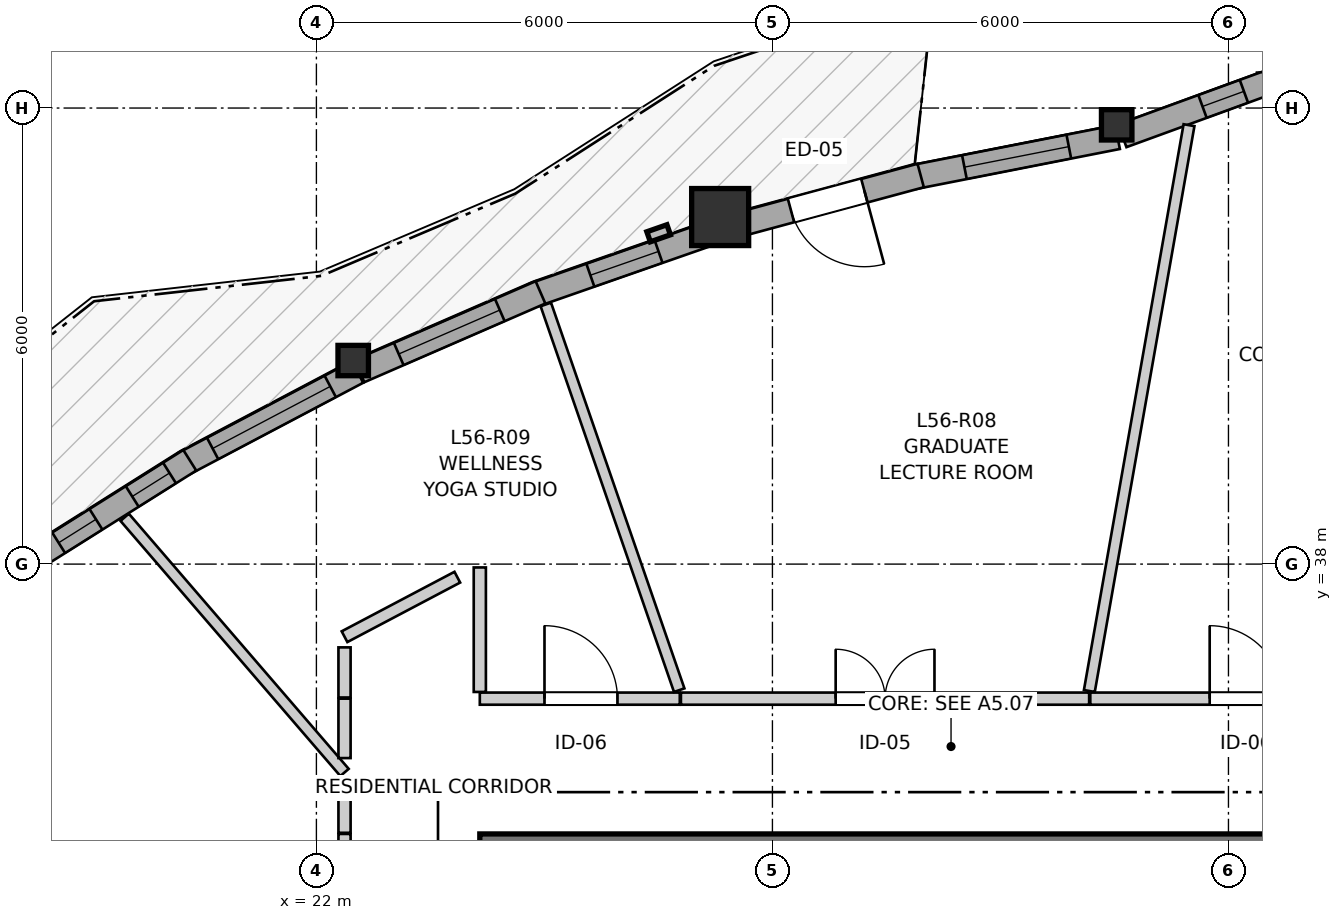
"""IFC4 building model, lengths in metres.
Left out: names, types, materials, properties, quantities, classifications, styles, units other than length and angle.
Written with IfcOpenShell. Run it as: python <this file> out.ifc"""

import sys

from ifc_helpers import new_model, si_unit, direction, frame, frame_2d, origin, origin_2d, place, context, subcontext, project, spatial, rectangle, i_section, extrude, source, transform, mapped, element, fill, save


model = new_model("IFC4")
c1 = context("Model", 3, precision=1e-05, world=origin(), true_north=direction((0.0, 1.0)))
c2 = subcontext(c1, "Body", "Model", "MODEL_VIEW")
j1 = project(units=[si_unit("LENGTHUNIT", "METRE"), si_unit("PLANEANGLEUNIT", "RADIAN")], contexts=[c1])
p1 = place(None, origin())
s1 = spatial("IfcSite", under=j1, at=p1, CompositionType="ELEMENT")
p2 = place(p1, origin())
s2 = spatial("IfcBuilding", under=s1, at=p2, CompositionType="ELEMENT")
p3 = place(p2, frame((0.0, 0.0, 187.4)))
s3 = spatial("IfcBuildingStorey", under=s2, at=p3, CompositionType="ELEMENT", Elevation=187.4)
p4 = place(p3, frame((36.55, 34.125, 0.0), z_axis=(0.0, 0.0, 1.0), x_axis=(-1.0, 0.0, 0.0)))
e1 = element("IfcWall", 1, at=p4, inside=s3, PredefinedType="SHEAR", context=c2, shape_type="SweptSolid", body=[
    extrude(rectangle(XDim=12.4, YDim=0.65, at=frame_2d((6.2, 0.0))), origin(), (0.0, 0.0, 1.0), 2.9),
])
m1 = source(origin(), c2, "Body", "SweptSolid", [
    extrude(i_section(OverallWidth=0.401, OverallDepth=0.399, WebThickness=0.023, FlangeThickness=0.036, FilletRadius=0.015, at=origin_2d()), origin(), (0.0, 0.0, 1.0), 2.9),
])
p5 = place(p3, frame((32.529, 43.779, 0.0), z_axis=(0.0, 0.0, 1.0), x_axis=(1.0, 0.0, 0.0)))
e2 = element("IfcColumn", 2, at=p5, inside=s3, PredefinedType="PILASTER", context=c2, shape_type="MappedRepresentation", body=[
    mapped(m1, transform((0.0, 0.0, 0.0), x_axis=(1.0, 0.0, 0.0), y_axis=(0.0, 1.0, 0.0), z_axis=(0.0, 0.0, 1.0), scale=1.0)),
])
m2 = source(origin(), c2, "Body", "SweptSolid", [
    extrude(rectangle(XDim=0.75, YDim=0.75, at=origin_2d()), origin(), (0.0, 0.0, 1.0), 2.9),
])
p6 = place(p3, frame((27.312, 42.566, 0.0), z_axis=(0.0, 0.0, 1.0), x_axis=(1.0, 0.0, 0.0)))
e3 = element("IfcColumn", 3, at=p6, inside=s3, PredefinedType="COLUMN", context=c2, shape_type="MappedRepresentation", body=[
    mapped(m2, transform((0.0, 0.0, 0.0), x_axis=(1.0, 0.0, 0.0), y_axis=(0.0, 1.0, 0.0), z_axis=(0.0, 0.0, 1.0), scale=1.0)),
])
p7 = place(p3, frame((22.484, 40.678, 0.0), z_axis=(0.0, 0.0, 1.0), x_axis=(1.0, 0.0, 0.0)))
e4 = element("IfcColumn", 4, at=p7, inside=s3, PredefinedType="PILASTER", context=c2, shape_type="MappedRepresentation", body=[
    mapped(m1, transform((0.0, 0.0, 0.0), x_axis=(1.0, 0.0, 0.0), y_axis=(0.0, 1.0, 0.0), z_axis=(0.0, 0.0, 1.0), scale=1.0)),
])
p8 = place(p3, frame((36.456, 44.311, 0.0), z_axis=(0.0, 0.0, 1.0), x_axis=(-0.999997246765, -0.002346585115, 0.0)))
e5 = element("IfcWall", 5, at=p8, inside=s3, PredefinedType="SOLIDWALL", context=c2, shape_type="SweptSolid", body=[
    extrude(rectangle(XDim=2.081, YDim=0.32, at=frame_2d((1.041, 0.0))), origin(), (0.0, 0.0, 1.0), 2.48),
])
p9 = place(p8, frame((0.315, 0.0, 0.82)))
e6 = element("IfcOpeningElement", 6, at=p9, cuts=e5, PredefinedType="OPENING", context=c2, shape_type="SweptSolid", body=[
    extrude(rectangle(XDim=1.45, YDim=1.25, at=frame_2d((0.725, 0.625))), frame((0.0, 0.17, 0.0), z_axis=(0.0, -1.0, 0.0), x_axis=(1.0, 0.0, 0.0)), (0.0, 0.0, 1.0), 0.34),
])
p10 = place(p3, frame((34.503, 44.329, 0.0), z_axis=(0.0, 0.0, 1.0), x_axis=(-0.939387553708, -0.342857148007, 0.0)))
e7 = element("IfcWall", 7, at=p10, inside=s3, PredefinedType="SOLIDWALL", context=c2, shape_type="SweptSolid", body=[
    extrude(rectangle(XDim=2.023, YDim=0.32, at=frame_2d((1.011, 0.0))), origin(), (0.0, 0.0, 1.0), 2.48),
])
p11 = place(p10, frame((0.319, 0.0, 0.82)))
e8 = element("IfcOpeningElement", 8, at=p11, cuts=e7, PredefinedType="OPENING", context=c2, shape_type="SweptSolid", body=[
    extrude(rectangle(XDim=0.58, YDim=1.35, at=frame_2d((0.29, 0.675))), frame((0.0, 0.17, 0.0), z_axis=(0.0, -1.0, 0.0), x_axis=(1.0, 0.0, 0.0)), (0.0, 0.0, 1.0), 0.34),
])
p12 = place(p3, frame((32.541, 43.618, 0.0), z_axis=(0.0, 0.0, 1.0), x_axis=(-0.981233088351, -0.192825377804, 0.0)))
e9 = element("IfcWall", 9, at=p12, inside=s3, PredefinedType="SOLIDWALL", context=c2, shape_type="SweptSolid", body=[
    extrude(rectangle(XDim=2.726, YDim=0.32, at=frame_2d((1.363, 0.0))), origin(), (0.0, 0.0, 1.0), 2.48),
])
p13 = place(p12, frame((0.653, 0.0, 0.82)))
e10 = element("IfcOpeningElement", 10, at=p13, cuts=e9, PredefinedType="OPENING", context=c2, shape_type="SweptSolid", body=[
    extrude(rectangle(XDim=1.4, YDim=1.35, at=frame_2d((0.7, 0.675))), frame((0.0, 0.17, 0.0), z_axis=(0.0, -1.0, 0.0), x_axis=(1.0, 0.0, 0.0)), (0.0, 0.0, 1.0), 0.34),
])
p14 = place(p3, frame((29.95, 43.112, 0.0), z_axis=(0.0, 0.0, 1.0), x_axis=(-0.96543906005, -0.260628895806, 0.0)))
e11 = element("IfcWall", 11, at=p14, inside=s3, PredefinedType="SOLIDWALL", context=c2, shape_type="SweptSolid", body=[
    extrude(rectangle(XDim=2.524, YDim=0.32, at=frame_2d((1.262, 0.0))), origin(), (0.0, 0.0, 1.0), 2.48),
])
p15 = place(p14, frame((0.767, 0.0, 0.0)))
e12 = element("IfcOpeningElement", 12, at=p15, cuts=e11, PredefinedType="OPENING", context=c2, shape_type="SweptSolid", body=[
    extrude(rectangle(XDim=1.0, YDim=2.1, at=frame_2d((0.5, 1.05))), frame((0.0, 0.17, 0.0), z_axis=(0.0, -1.0, 0.0), x_axis=(1.0, 0.0, 0.0)), (0.0, 0.0, 1.0), 0.34),
])
p16 = place(p3, frame((27.209, 42.361, 0.0), z_axis=(0.0, 0.0, 1.0), x_axis=(-0.944111191945, -0.329627148829, 0.0)))
e13 = element("IfcWall", 13, at=p16, inside=s3, PredefinedType="SOLIDWALL", context=c2, shape_type="SweptSolid", body=[
    extrude(rectangle(XDim=2.481, YDim=0.32, at=frame_2d((1.241, 0.0))), origin(), (0.0, 0.0, 1.0), 2.48),
])
p17 = place(p16, frame((0.75, 0.0, 0.82)))
e14 = element("IfcOpeningElement", 14, at=p17, cuts=e13, PredefinedType="OPENING", context=c2, shape_type="SweptSolid", body=[
    extrude(rectangle(XDim=0.95, YDim=1.35, at=frame_2d((0.475, 0.675))), frame((0.0, 0.17, 0.0), z_axis=(0.0, -1.0, 0.0), x_axis=(1.0, 0.0, 0.0)), (0.0, 0.0, 1.0), 0.34),
])
p18 = place(p3, frame((24.948, 41.575, 0.0), z_axis=(0.0, 0.0, 1.0), x_axis=(-0.917095460669, -0.398667676168, 0.0)))
e15 = element("IfcWall", 15, at=p18, inside=s3, PredefinedType="SOLIDWALL", context=c2, shape_type="SweptSolid", body=[
    extrude(rectangle(XDim=2.597, YDim=0.32, at=frame_2d((1.299, 0.0))), origin(), (0.0, 0.0, 1.0), 2.48),
])
p19 = place(p18, frame((0.583, 0.0, 0.82)))
e16 = element("IfcOpeningElement", 16, at=p19, cuts=e15, PredefinedType="OPENING", context=c2, shape_type="SweptSolid", body=[
    extrude(rectangle(XDim=1.45, YDim=1.25, at=frame_2d((0.725, 0.625))), frame((0.0, 0.17, 0.0), z_axis=(0.0, -1.0, 0.0), x_axis=(1.0, 0.0, 0.0)), (0.0, 0.0, 1.0), 0.34),
])
p20 = place(p3, frame((22.542, 40.527, 0.0), z_axis=(0.0, 0.0, 1.0), x_axis=(-0.884378248125, -0.466770944087, 0.0)))
e17 = element("IfcWall", 17, at=p20, inside=s3, PredefinedType="SOLIDWALL", context=c2, shape_type="SweptSolid", body=[
    extrude(rectangle(XDim=2.582, YDim=0.32, at=frame_2d((1.291, 0.0))), origin(), (0.0, 0.0, 1.0), 2.48),
])
p21 = place(p20, frame((0.406, 0.0, 0.82)))
e18 = element("IfcOpeningElement", 18, at=p21, cuts=e17, PredefinedType="OPENING", context=c2, shape_type="SweptSolid", body=[
    extrude(rectangle(XDim=1.75, YDim=1.3, at=frame_2d((0.875, 0.65))), frame((0.0, 0.17, 0.0), z_axis=(0.0, -1.0, 0.0), x_axis=(1.0, 0.0, 0.0)), (0.0, 0.0, 1.0), 0.34),
])
p22 = place(p3, frame((20.334, 39.366, 0.0), z_axis=(0.0, 0.0, 1.0), x_axis=(-0.84643016858, -0.532499736825, 0.0)))
e19 = element("IfcWall", 19, at=p22, inside=s3, PredefinedType="SOLIDWALL", context=c2, shape_type="SweptSolid", body=[
    extrude(rectangle(XDim=2.437, YDim=0.32, at=frame_2d((1.219, 0.0))), origin(), (0.0, 0.0, 1.0), 2.48),
])
p23 = place(p22, frame((0.315, 0.0, 0.82)))
e20 = element("IfcOpeningElement", 20, at=p23, cuts=e19, PredefinedType="OPENING", context=c2, shape_type="SweptSolid", body=[
    extrude(rectangle(XDim=0.58, YDim=1.35, at=frame_2d((0.29, 0.675))), frame((0.0, 0.17, 0.0), z_axis=(0.0, -1.0, 0.0), x_axis=(1.0, 0.0, 0.0)), (0.0, 0.0, 1.0), 0.34),
])
p24 = place(p22, frame((1.458, 0.0, 0.82)))
e21 = element("IfcOpeningElement", 21, at=p24, cuts=e19, PredefinedType="OPENING", context=c2, shape_type="SweptSolid", body=[
    extrude(rectangle(XDim=0.58, YDim=1.35, at=frame_2d((0.29, 0.675))), frame((0.0, 0.17, 0.0), z_axis=(0.0, -1.0, 0.0), x_axis=(1.0, 0.0, 0.0)), (0.0, 0.0, 1.0), 0.34),
])
p25 = place(p3, frame((22.37, 27.85, 0.0), z_axis=(0.0, 0.0, 1.0), x_axis=(0.0, 1.0, 0.0)))
e22 = element("IfcWall", 22, at=p25, inside=s3, PredefinedType="PARTITIONING", context=c2, shape_type="SweptSolid", body=[
    extrude(rectangle(XDim=6.6, YDim=0.16, at=frame_2d((3.3, 0.0))), origin(), (0.0, 0.0, 1.0), 2.9),
])
p26 = place(p25, frame((2.981, 0.0, 0.0)))
e23 = element("IfcOpeningElement", 23, at=p26, cuts=e22, PredefinedType="OPENING", context=c2, shape_type="SweptSolid", body=[
    extrude(rectangle(XDim=1.3, YDim=2.1, at=frame_2d((0.65, 1.05))), frame((0.0, 0.09, 0.0), z_axis=(0.0, -1.0, 0.0), x_axis=(1.0, 0.0, 0.0)), (0.0, 0.0, 1.0), 0.18),
])
p27 = place(p3, frame((26.796, 36.23, 0.0), z_axis=(0.0, 0.0, 1.0), x_axis=(1.0, 0.0, 0.0)))
e24 = element("IfcWall", 24, at=p27, inside=s3, PredefinedType="PARTITIONING", context=c2, shape_type="SweptSolid", body=[
    extrude(rectangle(XDim=5.371, YDim=0.16, at=frame_2d((2.686, 0.0))), origin(), (0.0, 0.0, 1.0), 2.9),
])
p28 = place(p27, frame((2.036, 0.0, 0.0)))
e25 = element("IfcOpeningElement", 25, at=p28, cuts=e24, PredefinedType="OPENING", context=c2, shape_type="SweptSolid", body=[
    extrude(rectangle(XDim=1.3, YDim=2.1, at=frame_2d((0.65, 1.05))), frame((0.0, 0.09, 0.0), z_axis=(0.0, -1.0, 0.0), x_axis=(1.0, 0.0, 0.0)), (0.0, 0.0, 1.0), 0.18),
])
p29 = place(p3, frame((32.182, 36.23, 0.0), z_axis=(0.0, 0.0, 1.0), x_axis=(1.0, 0.0, 0.0)))
e26 = element("IfcWall", 26, at=p29, inside=s3, PredefinedType="PARTITIONING", context=c2, shape_type="SweptSolid", body=[
    extrude(rectangle(XDim=4.149, YDim=0.16, at=frame_2d((2.075, 0.0))), origin(), (0.0, 0.0, 1.0), 2.538),
])
p30 = place(p29, frame((1.571, 0.0, 0.0)))
e27 = element("IfcOpeningElement", 27, at=p30, cuts=e26, PredefinedType="OPENING", context=c2, shape_type="SweptSolid", body=[
    extrude(rectangle(XDim=0.96, YDim=2.1, at=frame_2d((0.48, 1.05))), frame((0.0, 0.09, 0.0), z_axis=(0.0, -1.0, 0.0), x_axis=(1.0, 0.0, 0.0)), (0.0, 0.0, 1.0), 0.18),
])
p31 = place(p3, frame((24.15, 36.23, 0.0), z_axis=(0.0, 0.0, 1.0), x_axis=(1.0, 0.0, 0.0)))
e28 = element("IfcWall", 28, at=p31, inside=s3, PredefinedType="PARTITIONING", context=c2, shape_type="SweptSolid", body=[
    extrude(rectangle(XDim=2.631, YDim=0.16, at=frame_2d((1.315, 0.0))), origin(), (0.0, 0.0, 1.0), 2.9),
])
p32 = place(p31, frame((0.851, 0.0, 0.0)))
e29 = element("IfcOpeningElement", 29, at=p32, cuts=e28, PredefinedType="OPENING", context=c2, shape_type="SweptSolid", body=[
    extrude(rectangle(XDim=0.96, YDim=2.1, at=frame_2d((0.48, 1.05))), frame((0.0, 0.09, 0.0), z_axis=(0.0, -1.0, 0.0), x_axis=(1.0, 0.0, 0.0)), (0.0, 0.0, 1.0), 0.18),
])
p33 = place(p3, frame((32.17, 36.331, 0.0), z_axis=(0.0, 0.0, 1.0), x_axis=(0.173479457804, 0.984837487975, 0.0)))
e30 = element("IfcWall", 30, at=p33, inside=s3, PredefinedType="PARTITIONING", context=c2, shape_type="SweptSolid", body=[
    extrude(rectangle(XDim=7.559, YDim=0.145, at=frame_2d((3.779, 0.0))), origin(), (0.0, 0.0, 1.0), 2.9),
])
p34 = place(p3, frame((25.019, 41.416, 0.0), z_axis=(0.0, 0.0, 1.0), x_axis=(0.326820085254, -0.945086573746, 0.0)))
e31 = element("IfcWall", 31, at=p34, inside=s3, PredefinedType="PARTITIONING", context=c2, shape_type="SweptSolid", body=[
    extrude(rectangle(XDim=5.37, YDim=0.145, at=frame_2d((2.685, 0.0))), origin(), (0.0, 0.0, 1.0), 2.9),
])
p35 = place(p3, frame((19.477, 38.616, 0.0), z_axis=(0.0, 0.0, 1.0), x_axis=(0.652826266908, -0.757507666783, 0.0)))
e32 = element("IfcWall", 32, at=p35, inside=s3, PredefinedType="PARTITIONING", context=c2, shape_type="SweptSolid", body=[
    extrude(rectangle(XDim=4.431, YDim=0.145, at=frame_2d((2.216, 0.0))), origin(), (0.0, 0.0, 1.0), 2.9),
])
p36 = place(p3, frame((24.15, 36.318, 0.0), z_axis=(0.0, 0.0, 1.0), x_axis=(0.0, 1.0, 0.0)))
e33 = element("IfcWall", 33, at=p36, inside=s3, PredefinedType="PARTITIONING", context=c2, shape_type="SweptSolid", body=[
    extrude(rectangle(XDim=1.638, YDim=0.16, at=frame_2d((0.819, 0.0))), origin(), (0.0, 0.0, 1.0), 2.9),
])
p37 = place(p3, frame((22.37, 37.045, 0.0), z_axis=(0.0, 0.0, 1.0), x_axis=(0.884434803915, 0.466663773635, 0.0)))
e34 = element("IfcWall", 34, at=p37, inside=s3, PredefinedType="PARTITIONING", context=c2, shape_type="SweptSolid", body=[
    extrude(rectangle(XDim=1.678, YDim=0.16, at=frame_2d((0.839, 0.0))), origin(), (0.0, 0.0, 1.0), 2.508),
])
p38 = place(p3, frame((22.37, 35.448, 0.0), z_axis=(0.0, 0.0, 1.0), x_axis=(0.0, 1.0, 0.0)))
e35 = element("IfcWall", 35, at=p38, inside=s3, PredefinedType="PARTITIONING", context=c2, shape_type="SweptSolid", body=[
    extrude(rectangle(XDim=0.782, YDim=0.16, at=frame_2d((0.391, 0.0))), origin(), (0.0, 0.0, 1.0), 2.9),
])
p39 = place(p3, frame((22.37, 36.245, 0.0), z_axis=(0.0, 0.0, 1.0), x_axis=(0.0, 1.0, 0.0)))
e36 = element("IfcWall", 36, at=p39, inside=s3, PredefinedType="PARTITIONING", context=c2, shape_type="SweptSolid", body=[
    extrude(rectangle(XDim=0.659, YDim=0.16, at=frame_2d((0.33, 0.0))), origin(), (0.0, 0.0, 1.0), 2.9),
])
p40 = place(p3, frame((22.37, 34.465, 0.0), z_axis=(0.0, 0.0, 1.0), x_axis=(0.0, 1.0, 0.0)))
e37 = element("IfcWall", 37, at=p40, inside=s3, PredefinedType="PARTITIONING", context=c2, shape_type="SweptSolid", body=[
    extrude(rectangle(XDim=0.544, YDim=0.16, at=frame_2d((0.272, 0.0))), origin(), (0.0, 0.0, 1.0), 2.9),
])
m3 = source(origin(), c2, "Body", "SweptSolid", [
    extrude(rectangle(XDim=0.58, YDim=1.35, at=frame_2d((0.29, 0.675))), frame((0.0, 0.03, 0.0), z_axis=(0.0, -1.0, 0.0), x_axis=(1.0, 0.0, 0.0)), (0.0, 0.0, 1.0), 0.06),
])
p41 = place(p11, origin())
e38 = element("IfcWindow", 38, at=p41, inside=s3, PartitioningType="SINGLE_PANEL", PredefinedType="WINDOW", context=c2, shape_type="MappedRepresentation", body=[
    mapped(m3, transform((0.0, 0.0, 0.0), x_axis=(1.0, 0.0, 0.0), y_axis=(0.0, 1.0, 0.0), z_axis=(0.0, 0.0, 1.0), scale=1.0)),
])
fill(e8, e38)
m4 = source(origin(), c2, "Body", "SweptSolid", [
    extrude(rectangle(XDim=1.4, YDim=1.35, at=frame_2d((0.7, 0.675))), frame((0.0, 0.03, 0.0), z_axis=(0.0, -1.0, 0.0), x_axis=(1.0, 0.0, 0.0)), (0.0, 0.0, 1.0), 0.06),
])
p42 = place(p13, origin())
e39 = element("IfcWindow", 39, at=p42, inside=s3, PartitioningType="SINGLE_PANEL", PredefinedType="WINDOW", context=c2, shape_type="MappedRepresentation", body=[
    mapped(m4, transform((0.0, 0.0, 0.0), x_axis=(1.0, 0.0, 0.0), y_axis=(0.0, 1.0, 0.0), z_axis=(0.0, 0.0, 1.0), scale=1.0)),
])
fill(e10, e39)
m5 = source(origin(), c2, "Body", "SweptSolid", [
    extrude(rectangle(XDim=1.0, YDim=2.1, at=frame_2d((0.5, 1.05))), frame((0.0, 0.025, 0.0), z_axis=(0.0, -1.0, 0.0), x_axis=(1.0, 0.0, 0.0)), (0.0, 0.0, 1.0), 0.05),
])
p43 = place(p15, origin())
e40 = element("IfcDoor", 40, at=p43, inside=s3, OperationType="SINGLE_SWING_LEFT", PredefinedType="DOOR", context=c2, shape_type="MappedRepresentation", body=[
    mapped(m5, transform((0.0, 0.0, 0.0), x_axis=(1.0, 0.0, 0.0), y_axis=(0.0, 1.0, 0.0), z_axis=(0.0, 0.0, 1.0), scale=1.0)),
])
fill(e12, e40)
m6 = source(origin(), c2, "Body", "SweptSolid", [
    extrude(rectangle(XDim=0.95, YDim=1.35, at=frame_2d((0.475, 0.675))), frame((0.0, 0.03, 0.0), z_axis=(0.0, -1.0, 0.0), x_axis=(1.0, 0.0, 0.0)), (0.0, 0.0, 1.0), 0.06),
])
p44 = place(p17, origin())
e41 = element("IfcWindow", 41, at=p44, inside=s3, PartitioningType="SINGLE_PANEL", PredefinedType="WINDOW", context=c2, shape_type="MappedRepresentation", body=[
    mapped(m6, transform((0.0, 0.0, 0.0), x_axis=(1.0, 0.0, 0.0), y_axis=(0.0, 1.0, 0.0), z_axis=(0.0, 0.0, 1.0), scale=1.0)),
])
fill(e14, e41)
m7 = source(origin(), c2, "Body", "SweptSolid", [
    extrude(rectangle(XDim=1.45, YDim=1.25, at=frame_2d((0.725, 0.625))), frame((0.0, 0.03, 0.0), z_axis=(0.0, -1.0, 0.0), x_axis=(1.0, 0.0, 0.0)), (0.0, 0.0, 1.0), 0.06),
])
p45 = place(p19, origin())
e42 = element("IfcWindow", 42, at=p45, inside=s3, PartitioningType="SINGLE_PANEL", PredefinedType="WINDOW", context=c2, shape_type="MappedRepresentation", body=[
    mapped(m7, transform((0.0, 0.0, 0.0), x_axis=(1.0, 0.0, 0.0), y_axis=(0.0, 1.0, 0.0), z_axis=(0.0, 0.0, 1.0), scale=1.0)),
])
fill(e16, e42)
m8 = source(origin(), c2, "Body", "SweptSolid", [
    extrude(rectangle(XDim=1.75, YDim=1.3, at=frame_2d((0.875, 0.65))), frame((0.0, 0.03, 0.0), z_axis=(0.0, -1.0, 0.0), x_axis=(1.0, 0.0, 0.0)), (0.0, 0.0, 1.0), 0.06),
])
p46 = place(p21, origin())
e43 = element("IfcWindow", 43, at=p46, inside=s3, PartitioningType="SINGLE_PANEL", PredefinedType="WINDOW", context=c2, shape_type="MappedRepresentation", body=[
    mapped(m8, transform((0.0, 0.0, 0.0), x_axis=(1.0, 0.0, 0.0), y_axis=(0.0, 1.0, 0.0), z_axis=(0.0, 0.0, 1.0), scale=1.0)),
])
fill(e18, e43)
p47 = place(p23, origin())
e44 = element("IfcWindow", 44, at=p47, inside=s3, PartitioningType="SINGLE_PANEL", PredefinedType="WINDOW", context=c2, shape_type="MappedRepresentation", body=[
    mapped(m3, transform((0.0, 0.0, 0.0), x_axis=(1.0, 0.0, 0.0), y_axis=(0.0, 1.0, 0.0), z_axis=(0.0, 0.0, 1.0), scale=1.0)),
])
fill(e20, e44)
p48 = place(p24, origin())
e45 = element("IfcWindow", 45, at=p48, inside=s3, PartitioningType="SINGLE_PANEL", PredefinedType="WINDOW", context=c2, shape_type="MappedRepresentation", body=[
    mapped(m3, transform((0.0, 0.0, 0.0), x_axis=(1.0, 0.0, 0.0), y_axis=(0.0, 1.0, 0.0), z_axis=(0.0, 0.0, 1.0), scale=1.0)),
])
fill(e21, e45)
m9 = source(origin(), c2, "Body", "SweptSolid", [
    extrude(rectangle(XDim=1.3, YDim=2.1, at=frame_2d((0.65, 1.05))), frame((0.0, 0.025, 0.0), z_axis=(0.0, -1.0, 0.0), x_axis=(1.0, 0.0, 0.0)), (0.0, 0.0, 1.0), 0.05),
])
p49 = place(p28, origin())
e46 = element("IfcDoor", 46, at=p49, inside=s3, OperationType="DOUBLE_DOOR_SINGLE_SWING", PredefinedType="DOOR", context=c2, shape_type="MappedRepresentation", body=[
    mapped(m9, transform((0.0, 0.0, 0.0), x_axis=(1.0, 0.0, 0.0), y_axis=(0.0, 1.0, 0.0), z_axis=(0.0, 0.0, 1.0), scale=1.0)),
])
fill(e25, e46)
m10 = source(origin(), c2, "Body", "SweptSolid", [
    extrude(rectangle(XDim=0.96, YDim=2.1, at=frame_2d((0.48, 1.05))), frame((0.0, 0.025, 0.0), z_axis=(0.0, -1.0, 0.0), x_axis=(1.0, 0.0, 0.0)), (0.0, 0.0, 1.0), 0.05),
])
p50 = place(p30, origin())
e47 = element("IfcDoor", 47, at=p50, inside=s3, OperationType="SINGLE_SWING_LEFT", PredefinedType="DOOR", context=c2, shape_type="MappedRepresentation", body=[
    mapped(m10, transform((0.0, 0.0, 0.0), x_axis=(1.0, 0.0, 0.0), y_axis=(0.0, 1.0, 0.0), z_axis=(0.0, 0.0, 1.0), scale=1.0)),
])
fill(e27, e47)
p51 = place(p32, origin())
e48 = element("IfcDoor", 48, at=p51, inside=s3, OperationType="SINGLE_SWING_LEFT", PredefinedType="DOOR", context=c2, shape_type="MappedRepresentation", body=[
    mapped(m10, transform((0.0, 0.0, 0.0), x_axis=(1.0, 0.0, 0.0), y_axis=(0.0, 1.0, 0.0), z_axis=(0.0, 0.0, 1.0), scale=1.0)),
])
fill(e29, e48)
save(model, sys.argv[1])
